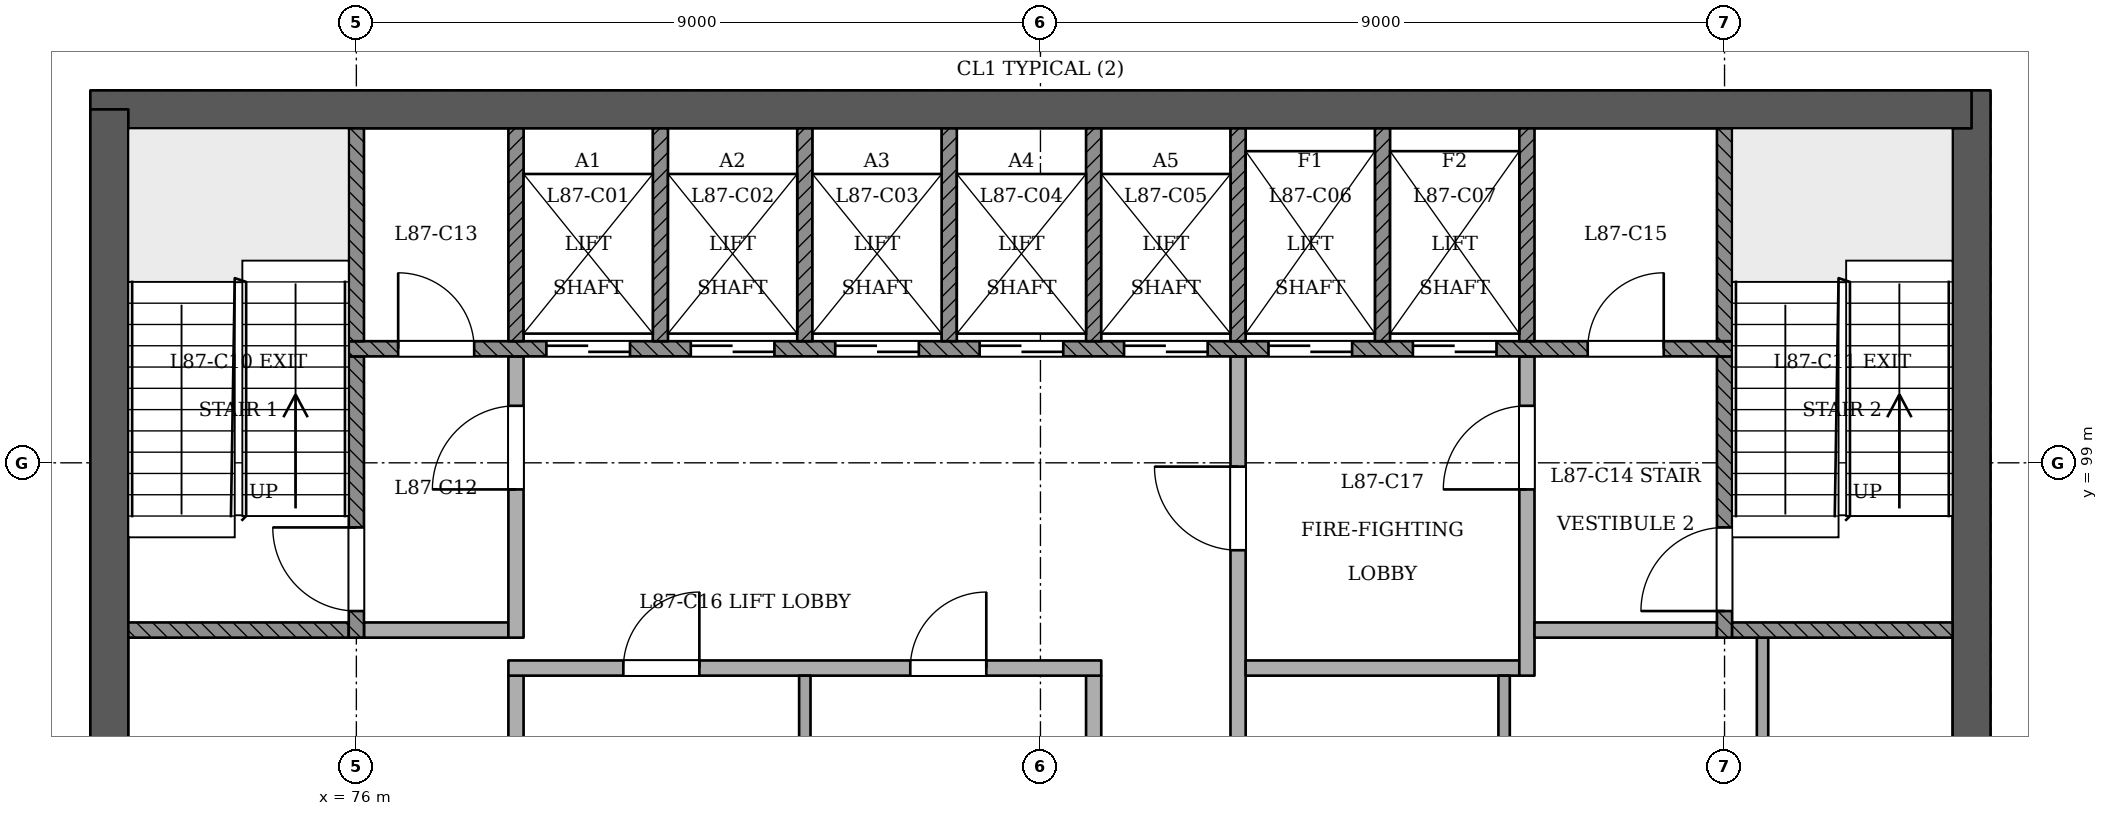
"""IFC4 building model, lengths in metres.
Left out: names, types, materials, properties, quantities, classifications, styles, units other than length and angle.
Written with IfcOpenShell. Run it as: python <this file> out.ifc"""

import sys

from ifc_helpers import new_model, si_unit, direction, frame, frame_2d, origin, place, context, subcontext, project, spatial, rectangle, extrude, element, fill, save


model = new_model("IFC4")
c1 = context("Model", 3, precision=1e-05, world=origin(), true_north=direction((0.0, 1.0)))
c2 = subcontext(c1, "Body", "Model", "MODEL_VIEW")
j1 = project(units=[si_unit("LENGTHUNIT", "METRE"), si_unit("PLANEANGLEUNIT", "RADIAN")], contexts=[c1])
p1 = place(None, origin())
s1 = spatial("IfcSite", under=j1, at=p1, CompositionType="ELEMENT")
p2 = place(p1, origin())
s2 = spatial("IfcBuilding", under=s1, at=p2, CompositionType="ELEMENT")
p3 = place(p2, frame((0.0, 0.0, 334.6)))
s3 = spatial("IfcBuildingStorey", under=s2, at=p3, CompositionType="ELEMENT", Elevation=334.6)
p4 = place(p3, frame((97.25, 93.15, 0.0), z_axis=(0.0, 0.0, 1.0), x_axis=(0.0, 1.0, 0.0)))
e1 = element("IfcWall", 1, at=p4, inside=s3, PredefinedType="SHEAR", context=c2, shape_type="SweptSolid", body=[
    extrude(rectangle(XDim=10.75, YDim=0.5, at=frame_2d((5.375, 0.0))), origin(), (0.0, 0.0, 1.0), 4.2),
])
p5 = place(p3, frame((97.25, 103.65, 0.0), z_axis=(0.0, 0.0, 1.0), x_axis=(-1.0, 0.0, 0.0)))
e2 = element("IfcWall", 2, at=p5, inside=s3, PredefinedType="SHEAR", context=c2, shape_type="SweptSolid", body=[
    extrude(rectangle(XDim=24.75, YDim=0.5, at=frame_2d((12.375, 0.0))), origin(), (0.0, 0.0, 1.0), 4.2),
])
p6 = place(p3, frame((72.75, 103.65, 0.0), z_axis=(0.0, 0.0, 1.0), x_axis=(0.0, -1.0, 0.0)))
e3 = element("IfcWall", 3, at=p6, inside=s3, PredefinedType="SHEAR", context=c2, shape_type="SweptSolid", body=[
    extrude(rectangle(XDim=10.75, YDim=0.5, at=frame_2d((5.375, 0.0))), origin(), (0.0, 0.0, 1.0), 4.2),
])
p7 = place(p3, frame((78.1, 93.4, 0.0), z_axis=(0.0, 0.0, 1.0), x_axis=(0.0, 1.0, 0.0)))
e4 = element("IfcWall", 4, at=p7, inside=s3, PredefinedType="PARTITIONING", context=c2, shape_type="SweptSolid", body=[
    extrude(rectangle(XDim=2.8, YDim=0.2, at=frame_2d((1.4, 0.0))), origin(), (0.0, 0.0, 1.0), 3.9),
])
p8 = place(p3, frame((81.9, 93.4, 0.0), z_axis=(0.0, 0.0, 1.0), x_axis=(0.0, 1.0, 0.0)))
e5 = element("IfcWall", 5, at=p8, inside=s3, PredefinedType="PARTITIONING", context=c2, shape_type="SweptSolid", body=[
    extrude(rectangle(XDim=2.8, YDim=0.15, at=frame_2d((1.4, 0.0))), origin(), (0.0, 0.0, 1.0), 3.9),
])
p9 = place(p3, frame((85.7, 93.4, 0.0), z_axis=(0.0, 0.0, 1.0), x_axis=(0.0, 1.0, 0.0)))
e6 = element("IfcWall", 6, at=p9, inside=s3, PredefinedType="PARTITIONING", context=c2, shape_type="SweptSolid", body=[
    extrude(rectangle(XDim=2.8, YDim=0.2, at=frame_2d((1.4, 0.0))), origin(), (0.0, 0.0, 1.0), 3.9),
])
p10 = place(p3, frame((87.6, 93.4, 0.0), z_axis=(0.0, 0.0, 1.0), x_axis=(0.0, 1.0, 0.0)))
e7 = element("IfcWall", 7, at=p10, inside=s3, PredefinedType="PARTITIONING", context=c2, shape_type="SweptSolid", body=[
    extrude(rectangle(XDim=7.0, YDim=0.2, at=frame_2d((3.5, 0.0))), origin(), (0.0, 0.0, 1.0), 3.9),
])
p11 = place(p10, frame((4.45, 0.0, 0.0)))
e8 = element("IfcOpeningElement", 8, at=p11, cuts=e7, PredefinedType="OPENING", context=c2, shape_type="SweptSolid", body=[
    extrude(rectangle(XDim=1.1, YDim=2.1, at=frame_2d((0.55, 1.05))), frame((0.0, 0.11, 0.0), z_axis=(0.0, -1.0, 0.0), x_axis=(1.0, 0.0, 0.0)), (0.0, 0.0, 1.0), 0.221),
])
p12 = place(p3, frame((91.1, 93.4, 0.0), z_axis=(0.0, 0.0, 1.0), x_axis=(0.0, 1.0, 0.0)))
e9 = element("IfcWall", 9, at=p12, inside=s3, PredefinedType="PARTITIONING", context=c2, shape_type="SweptSolid", body=[
    extrude(rectangle(XDim=2.8, YDim=0.15, at=frame_2d((1.4, 0.0))), origin(), (0.0, 0.0, 1.0), 3.9),
])
p13 = place(p3, frame((94.5, 93.4, 0.0), z_axis=(0.0, 0.0, 1.0), x_axis=(0.0, 1.0, 0.0)))
e10 = element("IfcWall", 10, at=p13, inside=s3, PredefinedType="PARTITIONING", context=c2, shape_type="SweptSolid", body=[
    extrude(rectangle(XDim=3.3, YDim=0.15, at=frame_2d((1.65, 0.0))), origin(), (0.0, 0.0, 1.0), 3.9),
])
p14 = place(p3, frame((78.0, 96.3, 0.0), z_axis=(0.0, 0.0, 1.0), x_axis=(1.0, 0.0, 0.0)))
e11 = element("IfcWall", 11, at=p14, inside=s3, PredefinedType="PARTITIONING", context=c2, shape_type="SweptSolid", body=[
    extrude(rectangle(XDim=7.8, YDim=0.2, at=frame_2d((3.9, 0.0))), origin(), (0.0, 0.0, 1.0), 3.9),
])
p15 = place(p14, frame((1.512, 0.0, 0.0)))
e12 = element("IfcOpeningElement", 12, at=p15, cuts=e11, PredefinedType="OPENING", context=c2, shape_type="SweptSolid", body=[
    extrude(rectangle(XDim=1.0, YDim=2.1, at=frame_2d((0.5, 1.05))), frame((0.0, 0.11, 0.0), z_axis=(0.0, -1.0, 0.0), x_axis=(1.0, 0.0, 0.0)), (0.0, 0.0, 1.0), 0.221),
])
p16 = place(p14, frame((5.288, 0.0, 0.0)))
e13 = element("IfcOpeningElement", 13, at=p16, cuts=e11, PredefinedType="OPENING", context=c2, shape_type="SweptSolid", body=[
    extrude(rectangle(XDim=1.0, YDim=2.1, at=frame_2d((0.5, 1.05))), frame((0.0, 0.11, 0.0), z_axis=(0.0, -1.0, 0.0), x_axis=(1.0, 0.0, 0.0)), (0.0, 0.0, 1.0), 0.221),
])
p17 = place(p3, frame((87.7, 96.3, 0.0), z_axis=(0.0, 0.0, 1.0), x_axis=(1.0, 0.0, 0.0)))
e14 = element("IfcWall", 14, at=p17, inside=s3, PredefinedType="PARTITIONING", context=c2, shape_type="SweptSolid", body=[
    extrude(rectangle(XDim=3.6, YDim=0.2, at=frame_2d((1.8, 0.0))), origin(), (0.0, 0.0, 1.0), 3.9),
])
p18 = place(p3, frame((91.4, 96.2, 0.0), z_axis=(0.0, 0.0, 1.0), x_axis=(0.0, 1.0, 0.0)))
e15 = element("IfcWall", 15, at=p18, inside=s3, PredefinedType="PARTITIONING", context=c2, shape_type="SweptSolid", body=[
    extrude(rectangle(XDim=4.2, YDim=0.2, at=frame_2d((2.1, 0.0))), origin(), (0.0, 0.0, 1.0), 3.9),
])
p19 = place(p18, frame((2.45, 0.0, 0.0)))
e16 = element("IfcOpeningElement", 16, at=p19, cuts=e15, PredefinedType="OPENING", context=c2, shape_type="SweptSolid", body=[
    extrude(rectangle(XDim=1.1, YDim=2.1, at=frame_2d((0.55, 1.05))), frame((0.0, 0.11, 0.0), z_axis=(0.0, -1.0, 0.0), x_axis=(1.0, 0.0, 0.0)), (0.0, 0.0, 1.0), 0.221),
])
p20 = place(p3, frame((73.0, 96.8, 0.0), z_axis=(0.0, 0.0, 1.0), x_axis=(1.0, 0.0, 0.0)))
e17 = element("IfcWall", 17, at=p20, inside=s3, PredefinedType="SOLIDWALL", context=c2, shape_type="SweptSolid", body=[
    extrude(rectangle(XDim=2.9, YDim=0.2, at=frame_2d((1.45, 0.0))), origin(), (0.0, 0.0, 1.0), 3.9),
])
p21 = place(p3, frame((76.0, 96.7, 0.0), z_axis=(0.0, 0.0, 1.0), x_axis=(0.0, 1.0, 0.0)))
e18 = element("IfcWall", 18, at=p21, inside=s3, PredefinedType="SOLIDWALL", context=c2, shape_type="SweptSolid", body=[
    extrude(rectangle(XDim=3.7, YDim=0.2, at=frame_2d((1.85, 0.0))), origin(), (0.0, 0.0, 1.0), 3.9),
])
p22 = place(p21, frame((0.35, 0.0, 0.0)))
e19 = element("IfcOpeningElement", 19, at=p22, cuts=e18, PredefinedType="OPENING", context=c2, shape_type="SweptSolid", body=[
    extrude(rectangle(XDim=1.1, YDim=2.1, at=frame_2d((0.55, 1.05))), frame((0.0, 0.11, 0.0), z_axis=(0.0, -1.0, 0.0), x_axis=(1.0, 0.0, 0.0)), (0.0, 0.0, 1.0), 0.221),
])
p23 = place(p3, frame((76.1, 96.8, 0.0), z_axis=(0.0, 0.0, 1.0), x_axis=(1.0, 0.0, 0.0)))
e20 = element("IfcWall", 20, at=p23, inside=s3, PredefinedType="PARTITIONING", context=c2, shape_type="SweptSolid", body=[
    extrude(rectangle(XDim=1.9, YDim=0.2, at=frame_2d((0.95, 0.0))), origin(), (0.0, 0.0, 1.0), 3.9),
])
p24 = place(p3, frame((78.1, 96.7, 0.0), z_axis=(0.0, 0.0, 1.0), x_axis=(0.0, 1.0, 0.0)))
e21 = element("IfcWall", 21, at=p24, inside=s3, PredefinedType="PARTITIONING", context=c2, shape_type="SweptSolid", body=[
    extrude(rectangle(XDim=3.7, YDim=0.2, at=frame_2d((1.85, 0.0))), origin(), (0.0, 0.0, 1.0), 3.9),
])
p25 = place(p24, frame((1.95, 0.0, 0.0)))
e22 = element("IfcOpeningElement", 22, at=p25, cuts=e21, PredefinedType="OPENING", context=c2, shape_type="SweptSolid", body=[
    extrude(rectangle(XDim=1.1, YDim=2.1, at=frame_2d((0.55, 1.05))), frame((0.0, 0.11, 0.0), z_axis=(0.0, -1.0, 0.0), x_axis=(1.0, 0.0, 0.0)), (0.0, 0.0, 1.0), 0.221),
])
p26 = place(p3, frame((91.5, 96.8, 0.0), z_axis=(0.0, 0.0, 1.0), x_axis=(1.0, 0.0, 0.0)))
e23 = element("IfcWall", 23, at=p26, inside=s3, PredefinedType="PARTITIONING", context=c2, shape_type="SweptSolid", body=[
    extrude(rectangle(XDim=2.4, YDim=0.2, at=frame_2d((1.2, 0.0))), origin(), (0.0, 0.0, 1.0), 3.9),
])
p27 = place(p3, frame((94.0, 96.7, 0.0), z_axis=(0.0, 0.0, 1.0), x_axis=(0.0, 1.0, 0.0)))
e24 = element("IfcWall", 24, at=p27, inside=s3, PredefinedType="SOLIDWALL", context=c2, shape_type="SweptSolid", body=[
    extrude(rectangle(XDim=3.7, YDim=0.2, at=frame_2d((1.85, 0.0))), origin(), (0.0, 0.0, 1.0), 3.9),
])
p28 = place(p27, frame((0.35, 0.0, 0.0)))
e25 = element("IfcOpeningElement", 25, at=p28, cuts=e24, PredefinedType="OPENING", context=c2, shape_type="SweptSolid", body=[
    extrude(rectangle(XDim=1.1, YDim=2.1, at=frame_2d((0.55, 1.05))), frame((0.0, 0.11, 0.0), z_axis=(0.0, -1.0, 0.0), x_axis=(1.0, 0.0, 0.0)), (0.0, 0.0, 1.0), 0.221),
])
p29 = place(p3, frame((94.1, 96.8, 0.0), z_axis=(0.0, 0.0, 1.0), x_axis=(1.0, 0.0, 0.0)))
e26 = element("IfcWall", 26, at=p29, inside=s3, PredefinedType="SOLIDWALL", context=c2, shape_type="SweptSolid", body=[
    extrude(rectangle(XDim=2.9, YDim=0.2, at=frame_2d((1.45, 0.0))), origin(), (0.0, 0.0, 1.0), 3.9),
])
p30 = place(p3, frame((75.9, 100.5, 0.0), z_axis=(0.0, 0.0, 1.0), x_axis=(1.0, 0.0, 0.0)))
e27 = element("IfcWall", 27, at=p30, inside=s3, PredefinedType="SOLIDWALL", context=c2, shape_type="SweptSolid", body=[
    extrude(rectangle(XDim=18.2, YDim=0.2, at=frame_2d((9.1, 0.0))), origin(), (0.0, 0.0, 1.0), 3.9),
])
p31 = place(p30, frame((2.6, 0.0, 0.0)))
e28 = element("IfcOpeningElement", 28, at=p31, cuts=e27, PredefinedType="OPENING", context=c2, shape_type="SweptSolid", body=[
    extrude(rectangle(XDim=1.1, YDim=2.1, at=frame_2d((0.55, 1.05))), frame((0.0, 0.11, 0.0), z_axis=(0.0, -1.0, 0.0), x_axis=(1.0, 0.0, 0.0)), (0.0, 0.0, 1.0), 0.221),
])
p32 = place(p30, frame((4.5, 0.0, 0.0)))
e29 = element("IfcOpeningElement", 29, at=p32, cuts=e27, PredefinedType="OPENING", context=c2, shape_type="SweptSolid", body=[
    extrude(rectangle(XDim=1.1, YDim=2.1, at=frame_2d((0.55, 1.05))), frame((0.0, 0.11, 0.0), z_axis=(0.0, -1.0, 0.0), x_axis=(1.0, 0.0, 0.0)), (0.0, 0.0, 1.0), 0.221),
])
p33 = place(p30, frame((6.4, 0.0, 0.0)))
e30 = element("IfcOpeningElement", 30, at=p33, cuts=e27, PredefinedType="OPENING", context=c2, shape_type="SweptSolid", body=[
    extrude(rectangle(XDim=1.1, YDim=2.1, at=frame_2d((0.55, 1.05))), frame((0.0, 0.11, 0.0), z_axis=(0.0, -1.0, 0.0), x_axis=(1.0, 0.0, 0.0)), (0.0, 0.0, 1.0), 0.221),
])
p34 = place(p30, frame((8.3, 0.0, 0.0)))
e31 = element("IfcOpeningElement", 31, at=p34, cuts=e27, PredefinedType="OPENING", context=c2, shape_type="SweptSolid", body=[
    extrude(rectangle(XDim=1.1, YDim=2.1, at=frame_2d((0.55, 1.05))), frame((0.0, 0.11, 0.0), z_axis=(0.0, -1.0, 0.0), x_axis=(1.0, 0.0, 0.0)), (0.0, 0.0, 1.0), 0.221),
])
p35 = place(p30, frame((10.2, 0.0, 0.0)))
e32 = element("IfcOpeningElement", 32, at=p35, cuts=e27, PredefinedType="OPENING", context=c2, shape_type="SweptSolid", body=[
    extrude(rectangle(XDim=1.1, YDim=2.1, at=frame_2d((0.55, 1.05))), frame((0.0, 0.11, 0.0), z_axis=(0.0, -1.0, 0.0), x_axis=(1.0, 0.0, 0.0)), (0.0, 0.0, 1.0), 0.221),
])
p36 = place(p30, frame((12.1, 0.0, 0.0)))
e33 = element("IfcOpeningElement", 33, at=p36, cuts=e27, PredefinedType="OPENING", context=c2, shape_type="SweptSolid", body=[
    extrude(rectangle(XDim=1.1, YDim=2.1, at=frame_2d((0.55, 1.05))), frame((0.0, 0.11, 0.0), z_axis=(0.0, -1.0, 0.0), x_axis=(1.0, 0.0, 0.0)), (0.0, 0.0, 1.0), 0.221),
])
p37 = place(p30, frame((14.0, 0.0, 0.0)))
e34 = element("IfcOpeningElement", 34, at=p37, cuts=e27, PredefinedType="OPENING", context=c2, shape_type="SweptSolid", body=[
    extrude(rectangle(XDim=1.1, YDim=2.1, at=frame_2d((0.55, 1.05))), frame((0.0, 0.11, 0.0), z_axis=(0.0, -1.0, 0.0), x_axis=(1.0, 0.0, 0.0)), (0.0, 0.0, 1.0), 0.221),
])
p38 = place(p30, frame((0.65, 0.0, 0.0)))
e35 = element("IfcOpeningElement", 35, at=p38, cuts=e27, PredefinedType="OPENING", context=c2, shape_type="SweptSolid", body=[
    extrude(rectangle(XDim=1.0, YDim=2.1, at=frame_2d((0.5, 1.05))), frame((0.0, 0.11, 0.0), z_axis=(0.0, -1.0, 0.0), x_axis=(1.0, 0.0, 0.0)), (0.0, 0.0, 1.0), 0.221),
])
p39 = place(p30, frame((16.3, 0.0, 0.0)))
e36 = element("IfcOpeningElement", 36, at=p39, cuts=e27, PredefinedType="OPENING", context=c2, shape_type="SweptSolid", body=[
    extrude(rectangle(XDim=1.0, YDim=2.1, at=frame_2d((0.5, 1.05))), frame((0.0, 0.11, 0.0), z_axis=(0.0, -1.0, 0.0), x_axis=(1.0, 0.0, 0.0)), (0.0, 0.0, 1.0), 0.221),
])
for number, where, z_axis, x_axis in (
    (37, (76.0, 100.6, 0.0), (0.0, 0.0, 1.0), (0.0, 1.0, 0.0)),
    (38, (78.1, 100.6, 0.0), (0.0, 0.0, 1.0), (0.0, 1.0, 0.0)),
    (39, (80.0, 100.6, 0.0), (0.0, 0.0, 1.0), (0.0, 1.0, 0.0)),
    (40, (81.9, 100.6, 0.0), (0.0, 0.0, 1.0), (0.0, 1.0, 0.0)),
    (41, (83.8, 100.6, 0.0), (0.0, 0.0, 1.0), (0.0, 1.0, 0.0)),
    (42, (85.7, 100.6, 0.0), (0.0, 0.0, 1.0), (0.0, 1.0, 0.0)),
    (43, (87.6, 100.6, 0.0), (0.0, 0.0, 1.0), (0.0, 1.0, 0.0)),
    (44, (89.5, 100.6, 0.0), (0.0, 0.0, 1.0), (0.0, 1.0, 0.0)),
    (45, (91.4, 100.6, 0.0), (0.0, 0.0, 1.0), (0.0, 1.0, 0.0)),
    (46, (94.0, 100.6, 0.0), (0.0, 0.0, 1.0), (0.0, 1.0, 0.0)),
):
    element("IfcWall", number, at=place(p3, frame(where, z_axis=z_axis, x_axis=x_axis)), inside=s3, PredefinedType="SOLIDWALL", context=c2, shape_type="SweptSolid", body=[
        extrude(rectangle(XDim=2.8, YDim=0.2, at=frame_2d((1.4, 0.0))), origin(), (0.0, 0.0, 1.0), 3.9),
    ])
p40 = place(p31, origin())
e47 = element("IfcDoor", 47, at=p40, inside=s3, OperationType="SLIDING_TO_RIGHT", PredefinedType="NOTDEFINED", context=c2, shape_type="SweptSolid", body=[
    extrude(rectangle(XDim=1.1, YDim=2.1, at=frame_2d((0.55, 1.05))), frame((0.0, 0.025, 0.0), z_axis=(0.0, -1.0, 0.0), x_axis=(1.0, 0.0, 0.0)), (0.0, 0.0, 1.0), 0.05),
])
fill(e28, e47)
p41 = place(p32, origin())
e48 = element("IfcDoor", 48, at=p41, inside=s3, OperationType="SLIDING_TO_LEFT", PredefinedType="NOTDEFINED", context=c2, shape_type="SweptSolid", body=[
    extrude(rectangle(XDim=1.1, YDim=2.1, at=frame_2d((0.55, 1.05))), frame((0.0, 0.025, 0.0), z_axis=(0.0, -1.0, 0.0), x_axis=(1.0, 0.0, 0.0)), (0.0, 0.0, 1.0), 0.05),
])
fill(e29, e48)
p42 = place(p33, origin())
e49 = element("IfcDoor", 49, at=p42, inside=s3, OperationType="SLIDING_TO_RIGHT", PredefinedType="NOTDEFINED", context=c2, shape_type="SweptSolid", body=[
    extrude(rectangle(XDim=1.1, YDim=2.1, at=frame_2d((0.55, 1.05))), frame((0.0, 0.025, 0.0), z_axis=(0.0, -1.0, 0.0), x_axis=(1.0, 0.0, 0.0)), (0.0, 0.0, 1.0), 0.05),
])
fill(e30, e49)
p43 = place(p34, origin())
e50 = element("IfcDoor", 50, at=p43, inside=s3, OperationType="SLIDING_TO_LEFT", PredefinedType="NOTDEFINED", context=c2, shape_type="SweptSolid", body=[
    extrude(rectangle(XDim=1.1, YDim=2.1, at=frame_2d((0.55, 1.05))), frame((0.0, 0.025, 0.0), z_axis=(0.0, -1.0, 0.0), x_axis=(1.0, 0.0, 0.0)), (0.0, 0.0, 1.0), 0.05),
])
fill(e31, e50)
p44 = place(p35, origin())
e51 = element("IfcDoor", 51, at=p44, inside=s3, OperationType="SLIDING_TO_RIGHT", PredefinedType="NOTDEFINED", context=c2, shape_type="SweptSolid", body=[
    extrude(rectangle(XDim=1.1, YDim=2.1, at=frame_2d((0.55, 1.05))), frame((0.0, 0.025, 0.0), z_axis=(0.0, -1.0, 0.0), x_axis=(1.0, 0.0, 0.0)), (0.0, 0.0, 1.0), 0.05),
])
fill(e32, e51)
p45 = place(p36, origin())
e52 = element("IfcDoor", 52, at=p45, inside=s3, OperationType="SLIDING_TO_RIGHT", PredefinedType="NOTDEFINED", context=c2, shape_type="SweptSolid", body=[
    extrude(rectangle(XDim=1.1, YDim=2.1, at=frame_2d((0.55, 1.05))), frame((0.0, 0.025, 0.0), z_axis=(0.0, -1.0, 0.0), x_axis=(1.0, 0.0, 0.0)), (0.0, 0.0, 1.0), 0.05),
])
fill(e33, e52)
p46 = place(p37, origin())
e53 = element("IfcDoor", 53, at=p46, inside=s3, OperationType="SLIDING_TO_LEFT", PredefinedType="NOTDEFINED", context=c2, shape_type="SweptSolid", body=[
    extrude(rectangle(XDim=1.1, YDim=2.1, at=frame_2d((0.55, 1.05))), frame((0.0, 0.025, 0.0), z_axis=(0.0, -1.0, 0.0), x_axis=(1.0, 0.0, 0.0)), (0.0, 0.0, 1.0), 0.05),
])
fill(e34, e53)
p47 = place(p22, origin())
e54 = element("IfcDoor", 54, at=p47, inside=s3, OperationType="SINGLE_SWING_RIGHT", PredefinedType="NOTDEFINED", context=c2, shape_type="SweptSolid", body=[
    extrude(rectangle(XDim=1.1, YDim=2.1, at=frame_2d((0.55, 1.05))), frame((0.0, 0.025, 0.0), z_axis=(0.0, -1.0, 0.0), x_axis=(1.0, 0.0, 0.0)), (0.0, 0.0, 1.0), 0.05),
])
fill(e19, e54)
p48 = place(p28, origin())
e55 = element("IfcDoor", 55, at=p48, inside=s3, OperationType="SINGLE_SWING_LEFT", PredefinedType="NOTDEFINED", context=c2, shape_type="SweptSolid", body=[
    extrude(rectangle(XDim=1.1, YDim=2.1, at=frame_2d((0.55, 1.05))), frame((0.0, 0.025, 0.0), z_axis=(0.0, -1.0, 0.0), x_axis=(1.0, 0.0, 0.0)), (0.0, 0.0, 1.0), 0.05),
])
fill(e25, e55)
p49 = place(p25, origin())
e56 = element("IfcDoor", 56, at=p49, inside=s3, OperationType="SINGLE_SWING_LEFT", PredefinedType="NOTDEFINED", context=c2, shape_type="SweptSolid", body=[
    extrude(rectangle(XDim=1.1, YDim=2.1, at=frame_2d((0.55, 1.05))), frame((0.0, 0.025, 0.0), z_axis=(0.0, -1.0, 0.0), x_axis=(1.0, 0.0, 0.0)), (0.0, 0.0, 1.0), 0.05),
])
fill(e22, e56)
p50 = place(p11, origin())
e57 = element("IfcDoor", 57, at=p50, inside=s3, OperationType="SINGLE_SWING_RIGHT", PredefinedType="NOTDEFINED", context=c2, shape_type="SweptSolid", body=[
    extrude(rectangle(XDim=1.1, YDim=2.1, at=frame_2d((0.55, 1.05))), frame((0.0, 0.025, 0.0), z_axis=(0.0, -1.0, 0.0), x_axis=(1.0, 0.0, 0.0)), (0.0, 0.0, 1.0), 0.05),
])
fill(e8, e57)
p51 = place(p19, origin())
e58 = element("IfcDoor", 58, at=p51, inside=s3, OperationType="SINGLE_SWING_LEFT", PredefinedType="NOTDEFINED", context=c2, shape_type="SweptSolid", body=[
    extrude(rectangle(XDim=1.1, YDim=2.1, at=frame_2d((0.55, 1.05))), frame((0.0, 0.025, 0.0), z_axis=(0.0, -1.0, 0.0), x_axis=(1.0, 0.0, 0.0)), (0.0, 0.0, 1.0), 0.05),
])
fill(e16, e58)
p52 = place(p38, origin())
e59 = element("IfcDoor", 59, at=p52, inside=s3, OperationType="SINGLE_SWING_LEFT", PredefinedType="NOTDEFINED", context=c2, shape_type="SweptSolid", body=[
    extrude(rectangle(XDim=1.0, YDim=2.1, at=frame_2d((0.5, 1.05))), frame((0.0, 0.025, 0.0), z_axis=(0.0, -1.0, 0.0), x_axis=(1.0, 0.0, 0.0)), (0.0, 0.0, 1.0), 0.05),
])
fill(e35, e59)
p53 = place(p39, origin())
e60 = element("IfcDoor", 60, at=p53, inside=s3, OperationType="SINGLE_SWING_RIGHT", PredefinedType="NOTDEFINED", context=c2, shape_type="SweptSolid", body=[
    extrude(rectangle(XDim=1.0, YDim=2.1, at=frame_2d((0.5, 1.05))), frame((0.0, 0.025, 0.0), z_axis=(0.0, -1.0, 0.0), x_axis=(1.0, 0.0, 0.0)), (0.0, 0.0, 1.0), 0.05),
])
fill(e36, e60)
p54 = place(p15, origin())
e61 = element("IfcDoor", 61, at=p54, inside=s3, OperationType="SINGLE_SWING_RIGHT", PredefinedType="NOTDEFINED", context=c2, shape_type="SweptSolid", body=[
    extrude(rectangle(XDim=1.0, YDim=2.1, at=frame_2d((0.5, 1.05))), frame((0.0, 0.025, 0.0), z_axis=(0.0, -1.0, 0.0), x_axis=(1.0, 0.0, 0.0)), (0.0, 0.0, 1.0), 0.05),
])
fill(e12, e61)
p55 = place(p16, origin())
e62 = element("IfcDoor", 62, at=p55, inside=s3, OperationType="SINGLE_SWING_RIGHT", PredefinedType="NOTDEFINED", context=c2, shape_type="SweptSolid", body=[
    extrude(rectangle(XDim=1.0, YDim=2.1, at=frame_2d((0.5, 1.05))), frame((0.0, 0.025, 0.0), z_axis=(0.0, -1.0, 0.0), x_axis=(1.0, 0.0, 0.0)), (0.0, 0.0, 1.0), 0.05),
])
fill(e13, e62)
save(model, sys.argv[1])
